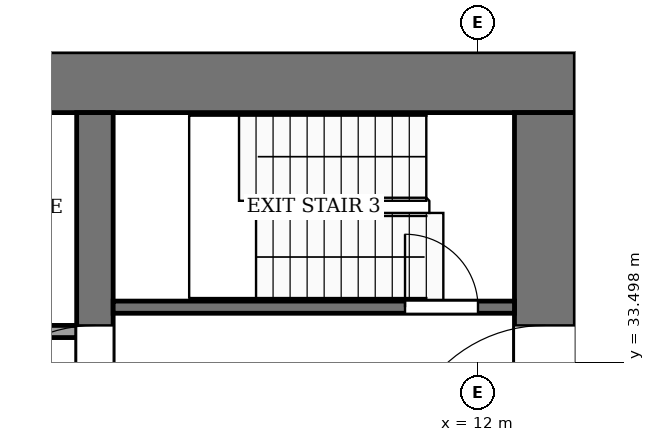
"""IFC4 building model, lengths in metres.
Left out: names, types, materials, properties, quantities, classifications, styles, units other than length and angle.
Written with IfcOpenShell. Run it as: python <this file> out.ifc"""

import sys

from ifc_helpers import new_model, si_unit, direction, frame, frame_2d, origin, place, context, subcontext, project, spatial, rectangle, extrude, element, fill, save


model = new_model("IFC4")
c1 = context("Model", 3, precision=1e-05, world=origin(), true_north=direction((0.0, 1.0)))
c2 = subcontext(c1, "Body", "Model", "MODEL_VIEW")
j1 = project(units=[si_unit("LENGTHUNIT", "METRE"), si_unit("PLANEANGLEUNIT", "RADIAN")], contexts=[c1])
p1 = place(None, origin())
s1 = spatial("IfcSite", under=j1, at=p1, CompositionType="ELEMENT")
p2 = place(p1, origin())
s2 = spatial("IfcBuilding", under=s1, at=p2, CompositionType="ELEMENT")
p3 = place(p2, frame((0.0, 0.0, 166.0)))
s3 = spatial("IfcBuildingStorey", under=s2, at=p3, CompositionType="ELEMENT", Elevation=166.0)
p4 = place(p3, frame((-13.6, 38.1, -0.13), z_axis=(0.0, 0.0, 1.0), x_axis=(1.0, 0.0, 0.0)))
e1 = element("IfcWall", 1, at=p4, inside=s3, PredefinedType="SHEAR", context=c2, shape_type="SweptSolid", body=[
    extrude(rectangle(XDim=27.2, YDim=1.0, at=frame_2d((13.6, 0.0))), origin(), (0.0, 0.0, 1.0), 3.88),
])
p5 = place(p3, frame((13.1, 18.4, -0.13), z_axis=(0.0, 0.0, 1.0), x_axis=(0.0, 1.0, 0.0)))
e2 = element("IfcWall", 2, at=p5, inside=s3, PredefinedType="SHEAR", context=c2, shape_type="SweptSolid", body=[
    extrude(rectangle(XDim=19.2, YDim=1.0, at=frame_2d((9.6, 0.0))), origin(), (0.0, 0.0, 1.0), 3.88),
])
p6 = place(p5, frame((2.8, 0.0, 0.13)))
e3 = element("IfcOpeningElement", 3, at=p6, cuts=e2, PredefinedType="OPENING", context=c2, shape_type="SweptSolid", body=[
    extrude(rectangle(XDim=2.4, YDim=2.4, at=frame_2d((1.2, 1.2))), frame((0.0, 0.51, 0.0), z_axis=(0.0, -1.0, 0.0), x_axis=(1.0, 0.0, 0.0)), (0.0, 0.0, 1.0), 1.02),
])
p7 = place(p5, frame((13.3, 0.0, 0.13)))
e4 = element("IfcOpeningElement", 4, at=p7, cuts=e2, PredefinedType="OPENING", context=c2, shape_type="SweptSolid", body=[
    extrude(rectangle(XDim=2.4, YDim=2.4, at=frame_2d((1.2, 1.2))), frame((0.0, 0.51, 0.0), z_axis=(0.0, -1.0, 0.0), x_axis=(1.0, 0.0, 0.0)), (0.0, 0.0, 1.0), 1.02),
])
p8 = place(p3, frame((5.7, 18.4, -0.13), z_axis=(0.0, 0.0, 1.0), x_axis=(0.0, 1.0, 0.0)))
e5 = element("IfcWall", 5, at=p8, inside=s3, PredefinedType="SHEAR", context=c2, shape_type="SweptSolid", body=[
    extrude(rectangle(XDim=19.2, YDim=0.6, at=frame_2d((9.6, 0.0))), origin(), (0.0, 0.0, 1.0), 3.88),
])
p9 = place(p8, frame((8.35, 0.0, 0.13)))
e6 = element("IfcOpeningElement", 6, at=p9, cuts=e5, PredefinedType="OPENING", context=c2, shape_type="SweptSolid", body=[
    extrude(rectangle(XDim=0.9, YDim=2.1, at=frame_2d((0.45, 1.05))), frame((0.0, 0.31, 0.0), z_axis=(0.0, -1.0, 0.0), x_axis=(1.0, 0.0, 0.0)), (0.0, 0.0, 1.0), 0.62),
])
p10 = place(p8, frame((13.3, 0.0, 0.13)))
e7 = element("IfcOpeningElement", 7, at=p10, cuts=e5, PredefinedType="OPENING", context=c2, shape_type="SweptSolid", body=[
    extrude(rectangle(XDim=2.4, YDim=2.4, at=frame_2d((1.2, 1.2))), frame((0.0, 0.31, 0.0), z_axis=(0.0, -1.0, 0.0), x_axis=(1.0, 0.0, 0.0)), (0.0, 0.0, 1.0), 0.62),
])
p11 = place(p3, frame((-5.4, 34.0, 0.0), z_axis=(0.0, 0.0, 1.0), x_axis=(1.0, 0.0, 0.0)))
e8 = element("IfcWall", 8, at=p11, inside=s3, PredefinedType="PARTITIONING", context=c2, shape_type="SweptSolid", body=[
    extrude(rectangle(XDim=10.8, YDim=0.2, at=frame_2d((5.4, 0.0))), origin(), (0.0, 0.0, 1.0), 3.75),
])
p12 = place(p11, frame((6.15, 0.0, 0.0)))
e9 = element("IfcOpeningElement", 9, at=p12, cuts=e8, PredefinedType="OPENING", context=c2, shape_type="SweptSolid", body=[
    extrude(rectangle(XDim=1.2, YDim=2.2, at=frame_2d((0.6, 1.1))), frame((0.0, 0.11, 0.0), z_axis=(0.0, -1.0, 0.0), x_axis=(1.0, 0.0, 0.0)), (0.0, 0.0, 1.0), 0.22),
])
p13 = place(p11, frame((8.95, 0.0, 0.0)))
e10 = element("IfcOpeningElement", 10, at=p13, cuts=e8, PredefinedType="OPENING", context=c2, shape_type="SweptSolid", body=[
    extrude(rectangle(XDim=1.0, YDim=2.1, at=frame_2d((0.5, 1.05))), frame((0.0, 0.11, 0.0), z_axis=(0.0, -1.0, 0.0), x_axis=(1.0, 0.0, 0.0)), (0.0, 0.0, 1.0), 0.22),
])
p14 = place(p3, frame((6.0, 34.4, 0.0), z_axis=(0.0, 0.0, 1.0), x_axis=(1.0, 0.0, 0.0)))
e11 = element("IfcWall", 11, at=p14, inside=s3, PredefinedType="PARTITIONING", context=c2, shape_type="SweptSolid", body=[
    extrude(rectangle(XDim=6.6, YDim=0.2, at=frame_2d((3.3, 0.0))), origin(), (0.0, 0.0, 1.0), 3.75),
])
p15 = place(p14, frame((4.8, 0.0, 0.0)))
e12 = element("IfcOpeningElement", 12, at=p15, cuts=e11, PredefinedType="OPENING", context=c2, shape_type="SweptSolid", body=[
    extrude(rectangle(XDim=1.2, YDim=2.2, at=frame_2d((0.6, 1.1))), frame((0.0, 0.11, 0.0), z_axis=(0.0, -1.0, 0.0), x_axis=(1.0, 0.0, 0.0)), (0.0, 0.0, 1.0), 0.22),
])
p16 = place(p15, origin())
e13 = element("IfcDoor", 13, at=p16, inside=s3, OperationType="SINGLE_SWING_RIGHT", PredefinedType="DOOR", context=c2, shape_type="SweptSolid", body=[
    extrude(rectangle(XDim=1.2, YDim=2.2, at=frame_2d((0.6, 1.1))), frame((0.0, 0.025, 0.0), z_axis=(0.0, -1.0, 0.0), x_axis=(1.0, 0.0, 0.0)), (0.0, 0.0, 1.0), 0.05),
])
fill(e12, e13)
p17 = place(p10, origin())
e14 = element("IfcDoor", 14, at=p17, inside=s3, OperationType="DOUBLE_DOOR_SINGLE_SWING", PredefinedType="DOOR", context=c2, shape_type="SweptSolid", body=[
    extrude(rectangle(XDim=2.4, YDim=2.4, at=frame_2d((1.2, 1.2))), frame((0.0, 0.025, 0.0), z_axis=(0.0, -1.0, 0.0), x_axis=(1.0, 0.0, 0.0)), (0.0, 0.0, 1.0), 0.05),
])
fill(e7, e14)
p18 = place(p7, origin())
e15 = element("IfcDoor", 15, at=p18, inside=s3, OperationType="DOUBLE_DOOR_SINGLE_SWING", PredefinedType="DOOR", context=c2, shape_type="SweptSolid", body=[
    extrude(rectangle(XDim=2.4, YDim=2.4, at=frame_2d((1.2, 1.2))), frame((0.0, 0.025, 0.0), z_axis=(0.0, -1.0, 0.0), x_axis=(1.0, 0.0, 0.0)), (0.0, 0.0, 1.0), 0.05),
])
fill(e4, e15)
save(model, sys.argv[1])
